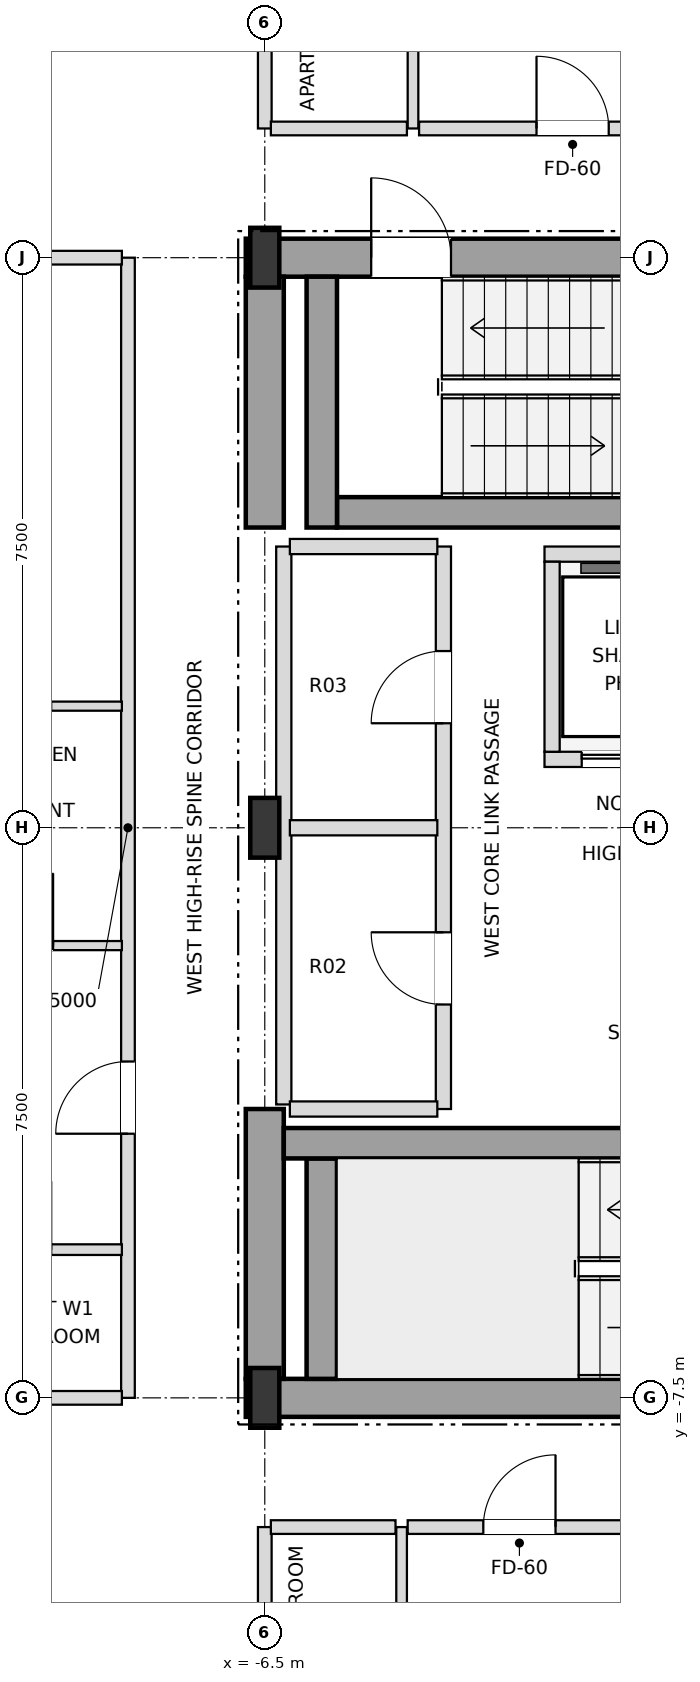
"""IFC4 building model, lengths in metres.
Left out: names, types, materials, properties, quantities, classifications, styles, units other than length and angle.
Written with IfcOpenShell. Run it as: python <this file> out.ifc"""

import sys

from ifc_helpers import new_model, si_unit, direction, frame, frame_2d, origin, origin_2d, place, context, subcontext, project, spatial, rectangle, i_section, extrude, element, fill, save


model = new_model("IFC4")
c1 = context("Model", 3, precision=1e-05, world=origin(), true_north=direction((0.0, 1.0)))
c2 = subcontext(c1, "Body", "Model", "MODEL_VIEW")
j1 = project(units=[si_unit("LENGTHUNIT", "METRE"), si_unit("PLANEANGLEUNIT", "RADIAN")], contexts=[c1])
p1 = place(None, origin())
s1 = spatial("IfcSite", under=j1, at=p1, CompositionType="ELEMENT")
p2 = place(p1, origin())
s2 = spatial("IfcBuilding", under=s1, at=p2, CompositionType="ELEMENT")
p3 = place(p2, frame((0.0, 0.0, 243.9)))
s3 = spatial("IfcBuildingStorey", under=s2, at=p3, CompositionType="ELEMENT", Elevation=243.9)
for number, where, z_axis, x_axis in (
    (1, (-6.5, -7.5, 0.0), (0.0, 0.0, 1.0), (1.0, 0.0, 0.0)),
    (2, (-6.5, 0.0, 0.0), (0.0, 0.0, 1.0), (1.0, 0.0, 0.0)),
    (3, (-6.5, 7.5, 0.0), (0.0, 0.0, 1.0), (1.0, 0.0, 0.0)),
):
    element("IfcColumn", number, at=place(p3, frame(where, z_axis=z_axis, x_axis=x_axis)), inside=s3, PredefinedType="COLUMN", context=c2, shape_type="SweptSolid", body=[
        extrude(i_section(OverallWidth=0.382, OverallDepth=0.786, WebThickness=0.02, FlangeThickness=0.033, at=origin_2d()), origin(), (0.0, 0.0, 1.0), 3.6),
    ])
p4 = place(p3, frame((-6.75, -7.5, 0.0), z_axis=(0.0, 0.0, 1.0), x_axis=(1.0, 0.0, 0.0)))
e4 = element("IfcWall", 4, at=p4, inside=s3, PredefinedType="SHEAR", context=c2, shape_type="SweptSolid", body=[
    extrude(rectangle(XDim=6.75, YDim=0.5, at=frame_2d((3.375, 0.0))), origin(), (0.0, 0.0, 1.0), 3.38),
])
p5 = place(p3, frame((-6.75, 7.5, 0.0), z_axis=(0.0, 0.0, 1.0), x_axis=(1.0, 0.0, 0.0)))
e5 = element("IfcWall", 5, at=p5, inside=s3, PredefinedType="SHEAR", context=c2, shape_type="SweptSolid", body=[
    extrude(rectangle(XDim=6.75, YDim=0.5, at=frame_2d((3.375, 0.0))), origin(), (0.0, 0.0, 1.0), 3.38),
])
p6 = place(p5, frame((1.65, 0.0, 0.0)))
e6 = element("IfcOpeningElement", 6, at=p6, cuts=e5, PredefinedType="OPENING", context=c2, shape_type="SweptSolid", body=[
    extrude(rectangle(XDim=1.05, YDim=2.15, at=frame_2d((0.525, 1.075))), frame((0.0, 0.26, 0.0), z_axis=(0.0, -1.0, 0.0), x_axis=(1.0, 0.0, 0.0)), (0.0, 0.0, 1.0), 0.52),
])
p7 = place(p3, frame((-6.5, -7.25, 0.0), z_axis=(0.0, 0.0, 1.0), x_axis=(0.0, 1.0, 0.0)))
e7 = element("IfcWall", 7, at=p7, inside=s3, PredefinedType="SHEAR", context=c2, shape_type="SweptSolid", body=[
    extrude(rectangle(XDim=3.55, YDim=0.5, at=frame_2d((1.775, 0.0))), origin(), (0.0, 0.0, 1.0), 3.38),
])
p8 = place(p3, frame((-6.5, 3.95, 0.0), z_axis=(0.0, 0.0, 1.0), x_axis=(0.0, 1.0, 0.0)))
e8 = element("IfcWall", 8, at=p8, inside=s3, PredefinedType="SHEAR", context=c2, shape_type="SweptSolid", body=[
    extrude(rectangle(XDim=3.3, YDim=0.5, at=frame_2d((1.65, 0.0))), origin(), (0.0, 0.0, 1.0), 3.38),
])
p9 = place(p3, frame((-5.75, -7.25, 0.0), z_axis=(0.0, 0.0, 1.0), x_axis=(0.0, 1.0, 0.0)))
e9 = element("IfcWall", 9, at=p9, inside=s3, PredefinedType="SHEAR", context=c2, shape_type="SweptSolid", body=[
    extrude(rectangle(XDim=2.9, YDim=0.4, at=frame_2d((1.45, 0.0))), origin(), (0.0, 0.0, 1.0), 3.38),
])
p10 = place(p3, frame((-6.25, -4.15, 0.0), z_axis=(0.0, 0.0, 1.0), x_axis=(1.0, 0.0, 0.0)))
e10 = element("IfcWall", 10, at=p10, inside=s3, PredefinedType="SHEAR", context=c2, shape_type="SweptSolid", body=[
    extrude(rectangle(XDim=7.78, YDim=0.4, at=frame_2d((3.89, 0.0))), origin(), (0.0, 0.0, 1.0), 3.38),
])
p11 = place(p3, frame((-5.55, 4.15, 0.0), z_axis=(0.0, 0.0, 1.0), x_axis=(1.0, 0.0, 0.0)))
e11 = element("IfcWall", 11, at=p11, inside=s3, PredefinedType="SHEAR", context=c2, shape_type="SweptSolid", body=[
    extrude(rectangle(XDim=7.08, YDim=0.4, at=frame_2d((3.54, 0.0))), origin(), (0.0, 0.0, 1.0), 3.38),
])
p12 = place(p3, frame((-5.75, 3.95, 0.0), z_axis=(0.0, 0.0, 1.0), x_axis=(0.0, 1.0, 0.0)))
e12 = element("IfcWall", 12, at=p12, inside=s3, PredefinedType="SHEAR", context=c2, shape_type="SweptSolid", body=[
    extrude(rectangle(XDim=3.3, YDim=0.4, at=frame_2d((1.65, 0.0))), origin(), (0.0, 0.0, 1.0), 3.38),
])
p13 = place(p3, frame((-2.82, 0.9, 0.0), z_axis=(0.0, 0.0, 1.0), x_axis=(1.0, 0.0, 0.0)))
e13 = element("IfcWall", 13, at=p13, inside=s3, PredefinedType="SOLIDWALL", context=c2, shape_type="SweptSolid", body=[
    extrude(rectangle(XDim=5.58, YDim=0.2, at=frame_2d((2.79, 0.0))), origin(), (0.0, 0.0, 1.0), 3.38),
])
p14 = place(p13, frame((0.49, 0.0, 0.0)))
e14 = element("IfcOpeningElement", 14, at=p14, cuts=e13, PredefinedType="OPENING", context=c2, shape_type="SweptSolid", body=[
    extrude(rectangle(XDim=1.1, YDim=2.15, at=frame_2d((0.55, 1.075))), frame((0.0, 0.11, 0.0), z_axis=(0.0, -1.0, 0.0), x_axis=(1.0, 0.0, 0.0)), (0.0, 0.0, 1.0), 0.22),
])
p15 = place(p13, frame((2.17, 0.0, 0.0)))
e15 = element("IfcOpeningElement", 15, at=p15, cuts=e13, PredefinedType="OPENING", context=c2, shape_type="SweptSolid", body=[
    extrude(rectangle(XDim=1.1, YDim=2.15, at=frame_2d((0.55, 1.075))), frame((0.0, 0.11, 0.0), z_axis=(0.0, -1.0, 0.0), x_axis=(1.0, 0.0, 0.0)), (0.0, 0.0, 1.0), 0.22),
])
p16 = place(p13, frame((3.86, 0.0, 0.0)))
e16 = element("IfcOpeningElement", 16, at=p16, cuts=e13, PredefinedType="OPENING", context=c2, shape_type="SweptSolid", body=[
    extrude(rectangle(XDim=1.2, YDim=2.2, at=frame_2d((0.6, 1.1))), frame((0.0, 0.11, 0.0), z_axis=(0.0, -1.0, 0.0), x_axis=(1.0, 0.0, 0.0)), (0.0, 0.0, 1.0), 0.22),
])
p17 = place(p3, frame((-2.82, 3.6, 0.0), z_axis=(0.0, 0.0, 1.0), x_axis=(1.0, 0.0, 0.0)))
e17 = element("IfcWall", 17, at=p17, inside=s3, PredefinedType="SOLIDWALL", context=c2, shape_type="SweptSolid", body=[
    extrude(rectangle(XDim=5.58, YDim=0.2, at=frame_2d((2.79, 0.0))), origin(), (0.0, 0.0, 1.0), 3.38),
])
p18 = place(p3, frame((-2.72, 1.0, 0.0), z_axis=(0.0, 0.0, 1.0), x_axis=(0.0, 1.0, 0.0)))
e18 = element("IfcWall", 18, at=p18, inside=s3, PredefinedType="SOLIDWALL", context=c2, shape_type="SweptSolid", body=[
    extrude(rectangle(XDim=2.5, YDim=0.2, at=frame_2d((1.25, 0.0))), origin(), (0.0, 0.0, 1.0), 3.38),
])
p19 = place(p3, frame((-8.3, -7.5, 0.0), z_axis=(0.0, 0.0, 1.0), x_axis=(0.0, 1.0, 0.0)))
e19 = element("IfcWall", 19, at=p19, inside=s3, PredefinedType="PARTITIONING", context=c2, shape_type="SweptSolid", body=[
    extrude(rectangle(XDim=15.0, YDim=0.18, at=frame_2d((7.5, 0.0))), origin(), (0.0, 0.0, 1.0), 3.38),
])
p20 = place(p19, frame((3.475, 0.0, 0.0)))
e20 = element("IfcOpeningElement", 20, at=p20, cuts=e19, PredefinedType="OPENING", context=c2, shape_type="SweptSolid", body=[
    extrude(rectangle(XDim=0.95, YDim=2.15, at=frame_2d((0.475, 1.075))), frame((0.0, 0.1, 0.0), z_axis=(0.0, -1.0, 0.0), x_axis=(1.0, 0.0, 0.0)), (0.0, 0.0, 1.0), 0.2),
])
for number, where, z_axis, x_axis in (
    (21, (-6.5, -19.9, 0.0), (0.0, 0.0, 1.0), (0.0, 1.0, 0.0)),
    (22, (-6.5, 9.2, 0.0), (0.0, 0.0, 1.0), (0.0, 1.0, 0.0)),
):
    element("IfcWall", number, at=place(p3, frame(where, z_axis=z_axis, x_axis=x_axis)), inside=s3, PredefinedType="PARTITIONING", context=c2, shape_type="SweptSolid", body=[
        extrude(rectangle(XDim=10.7, YDim=0.18, at=frame_2d((5.35, 0.0))), origin(), (0.0, 0.0, 1.0), 2.826),
    ])
p21 = place(p3, frame((-6.25, -3.64, 0.0), z_axis=(0.0, 0.0, 1.0), x_axis=(0.0, 1.0, 0.0)))
e23 = element("IfcWall", 23, at=p21, inside=s3, PredefinedType="SOLIDWALL", context=c2, shape_type="SweptSolid", body=[
    extrude(rectangle(XDim=7.34, YDim=0.2, at=frame_2d((3.67, 0.0))), origin(), (0.0, 0.0, 1.0), 3.38),
])
p22 = place(p3, frame((-4.7, -13.9, 0.0), z_axis=(0.0, 0.0, 1.0), x_axis=(0.0, 1.0, 0.0)))
e24 = element("IfcWall", 24, at=p22, inside=s3, PredefinedType="PARTITIONING", context=c2, shape_type="SweptSolid", body=[
    extrude(rectangle(XDim=4.7, YDim=0.14, at=frame_2d((2.35, 0.0))), origin(), (0.0, 0.0, 1.0), 3.38),
])
p23 = place(p22, frame((1.9, 0.0, 0.0)))
e25 = element("IfcOpeningElement", 25, at=p23, cuts=e24, PredefinedType="OPENING", context=c2, shape_type="SweptSolid", body=[
    extrude(rectangle(XDim=0.9, YDim=2.1, at=frame_2d((0.45, 1.05))), frame((0.0, 0.08, 0.0), z_axis=(0.0, -1.0, 0.0), x_axis=(1.0, 0.0, 0.0)), (0.0, 0.0, 1.0), 0.16),
])
p24 = place(p3, frame((-4.55, 9.2, 0.0), z_axis=(0.0, 0.0, 1.0), x_axis=(0.0, 1.0, 0.0)))
e26 = element("IfcWall", 26, at=p24, inside=s3, PredefinedType="PARTITIONING", context=c2, shape_type="SweptSolid", body=[
    extrude(rectangle(XDim=4.7, YDim=0.14, at=frame_2d((2.35, 0.0))), origin(), (0.0, 0.0, 1.0), 3.38),
])
p25 = place(p24, frame((1.9, 0.0, 0.0)))
e27 = element("IfcOpeningElement", 27, at=p25, cuts=e26, PredefinedType="OPENING", context=c2, shape_type="SweptSolid", body=[
    extrude(rectangle(XDim=0.9, YDim=2.1, at=frame_2d((0.45, 1.05))), frame((0.0, 0.08, 0.0), z_axis=(0.0, -1.0, 0.0), x_axis=(1.0, 0.0, 0.0)), (0.0, 0.0, 1.0), 0.16),
])
p26 = place(p3, frame((-4.15, -3.7, 0.0), z_axis=(0.0, 0.0, 1.0), x_axis=(0.0, 1.0, 0.0)))
e28 = element("IfcWall", 28, at=p26, inside=s3, PredefinedType="SOLIDWALL", context=c2, shape_type="SweptSolid", body=[
    extrude(rectangle(XDim=7.4, YDim=0.2, at=frame_2d((3.7, 0.0))), origin(), (0.0, 0.0, 1.0), 3.38),
])
p27 = place(p26, frame((1.375, 0.0, 0.0)))
e29 = element("IfcOpeningElement", 29, at=p27, cuts=e28, PredefinedType="OPENING", context=c2, shape_type="SweptSolid", body=[
    extrude(rectangle(XDim=0.95, YDim=2.15, at=frame_2d((0.475, 1.075))), frame((0.0, 0.11, 0.0), z_axis=(0.0, -1.0, 0.0), x_axis=(1.0, 0.0, 0.0)), (0.0, 0.0, 1.0), 0.22),
])
p28 = place(p26, frame((5.075, 0.0, 0.0)))
e30 = element("IfcOpeningElement", 30, at=p28, cuts=e28, PredefinedType="OPENING", context=c2, shape_type="SweptSolid", body=[
    extrude(rectangle(XDim=0.95, YDim=2.15, at=frame_2d((0.475, 1.075))), frame((0.0, 0.11, 0.0), z_axis=(0.0, -1.0, 0.0), x_axis=(1.0, 0.0, 0.0)), (0.0, 0.0, 1.0), 0.22),
])
p29 = place(p3, frame((-6.42, -9.2, 0.0), z_axis=(0.0, 0.0, 1.0), x_axis=(1.0, 0.0, 0.0)))
e31 = element("IfcWall", 31, at=p29, inside=s3, PredefinedType="PARTITIONING", context=c2, shape_type="SweptSolid", body=[
    extrude(rectangle(XDim=1.64, YDim=0.18, at=frame_2d((0.82, 0.0))), origin(), (0.0, 0.0, 1.0), 3.38),
])
p30 = place(p3, frame((-4.62, -9.2, 0.0), z_axis=(0.0, 0.0, 1.0), x_axis=(1.0, 0.0, 0.0)))
e32 = element("IfcWall", 32, at=p30, inside=s3, PredefinedType="PARTITIONING", context=c2, shape_type="SweptSolid", body=[
    extrude(rectangle(XDim=2.94, YDim=0.18, at=frame_2d((1.47, 0.0))), origin(), (0.0, 0.0, 1.0), 3.38),
])
p31 = place(p30, frame((0.995, 0.0, 0.0)))
e33 = element("IfcOpeningElement", 33, at=p31, cuts=e32, PredefinedType="OPENING", context=c2, shape_type="SweptSolid", body=[
    extrude(rectangle(XDim=0.95, YDim=2.15, at=frame_2d((0.475, 1.075))), frame((0.0, 0.1, 0.0), z_axis=(0.0, -1.0, 0.0), x_axis=(1.0, 0.0, 0.0)), (0.0, 0.0, 1.0), 0.2),
])
p32 = place(p3, frame((-11.12, -7.5, 0.0), z_axis=(0.0, 0.0, 1.0), x_axis=(1.0, 0.0, 0.0)))
e34 = element("IfcWall", 34, at=p32, inside=s3, PredefinedType="PARTITIONING", context=c2, shape_type="SweptSolid", body=[
    extrude(rectangle(XDim=2.74, YDim=0.18, at=frame_2d((1.37, 0.0))), origin(), (0.0, 0.0, 1.0), 2.826),
])
p33 = place(p3, frame((-11.12, -5.55, 0.0), z_axis=(0.0, 0.0, 1.0), x_axis=(1.0, 0.0, 0.0)))
e35 = element("IfcWall", 35, at=p33, inside=s3, PredefinedType="PARTITIONING", context=c2, shape_type="SweptSolid", body=[
    extrude(rectangle(XDim=2.74, YDim=0.14, at=frame_2d((1.37, 0.0))), origin(), (0.0, 0.0, 1.0), 3.38),
])
p34 = place(p33, frame((0.91, 0.0, 0.0)))
e36 = element("IfcOpeningElement", 36, at=p34, cuts=e35, PredefinedType="OPENING", context=c2, shape_type="SweptSolid", body=[
    extrude(rectangle(XDim=0.9, YDim=2.1, at=frame_2d((0.45, 1.05))), frame((0.0, 0.08, 0.0), z_axis=(0.0, -1.0, 0.0), x_axis=(1.0, 0.0, 0.0)), (0.0, 0.0, 1.0), 0.16),
])
p35 = place(p3, frame((-6.17, -3.7, 0.0), z_axis=(0.0, 0.0, 1.0), x_axis=(1.0, 0.0, 0.0)))
e37 = element("IfcWall", 37, at=p35, inside=s3, PredefinedType="SOLIDWALL", context=c2, shape_type="SweptSolid", body=[
    extrude(rectangle(XDim=1.94, YDim=0.2, at=frame_2d((0.97, 0.0))), origin(), (0.0, 0.0, 1.0), 3.38),
])
p36 = place(p3, frame((-11.12, -1.55, 0.0), z_axis=(0.0, 0.0, 1.0), x_axis=(1.0, 0.0, 0.0)))
e38 = element("IfcWall", 38, at=p36, inside=s3, PredefinedType="PARTITIONING", context=c2, shape_type="SweptSolid", body=[
    extrude(rectangle(XDim=2.74, YDim=0.12, at=frame_2d((1.37, 0.0))), origin(), (0.0, 0.0, 1.0), 3.38),
])
p37 = place(p36, frame((0.885, 0.0, 0.0)))
e39 = element("IfcOpeningElement", 39, at=p37, cuts=e38, PredefinedType="OPENING", context=c2, shape_type="SweptSolid", body=[
    extrude(rectangle(XDim=0.95, YDim=2.1, at=frame_2d((0.475, 1.05))), frame((0.0, 0.07, 0.0), z_axis=(0.0, -1.0, 0.0), x_axis=(1.0, 0.0, 0.0)), (0.0, 0.0, 1.0), 0.14),
])
p38 = place(p3, frame((-6.17, 0.0, 0.0), z_axis=(0.0, 0.0, 1.0), x_axis=(1.0, 0.0, 0.0)))
e40 = element("IfcWall", 40, at=p38, inside=s3, PredefinedType="SOLIDWALL", context=c2, shape_type="SweptSolid", body=[
    extrude(rectangle(XDim=1.94, YDim=0.2, at=frame_2d((0.97, 0.0))), origin(), (0.0, 0.0, 1.0), 3.38),
])
p39 = place(p3, frame((-11.12, 1.6, 0.0), z_axis=(0.0, 0.0, 1.0), x_axis=(1.0, 0.0, 0.0)))
e41 = element("IfcWall", 41, at=p39, inside=s3, PredefinedType="PARTITIONING", context=c2, shape_type="SweptSolid", body=[
    extrude(rectangle(XDim=2.74, YDim=0.12, at=frame_2d((1.37, 0.0))), origin(), (0.0, 0.0, 1.0), 3.38),
])
p40 = place(p39, frame((0.91, 0.0, 0.0)))
e42 = element("IfcOpeningElement", 42, at=p40, cuts=e41, PredefinedType="OPENING", context=c2, shape_type="SweptSolid", body=[
    extrude(rectangle(XDim=0.9, YDim=2.1, at=frame_2d((0.45, 1.05))), frame((0.0, 0.07, 0.0), z_axis=(0.0, -1.0, 0.0), x_axis=(1.0, 0.0, 0.0)), (0.0, 0.0, 1.0), 0.14),
])
p41 = place(p3, frame((-6.17, 3.7, 0.0), z_axis=(0.0, 0.0, 1.0), x_axis=(1.0, 0.0, 0.0)))
e43 = element("IfcWall", 43, at=p41, inside=s3, PredefinedType="SOLIDWALL", context=c2, shape_type="SweptSolid", body=[
    extrude(rectangle(XDim=1.94, YDim=0.2, at=frame_2d((0.97, 0.0))), origin(), (0.0, 0.0, 1.0), 3.38),
])
p42 = place(p3, frame((-11.12, 7.5, 0.0), z_axis=(0.0, 0.0, 1.0), x_axis=(1.0, 0.0, 0.0)))
e44 = element("IfcWall", 44, at=p42, inside=s3, PredefinedType="PARTITIONING", context=c2, shape_type="SweptSolid", body=[
    extrude(rectangle(XDim=2.74, YDim=0.18, at=frame_2d((1.37, 0.0))), origin(), (0.0, 0.0, 1.0), 2.826),
])
p43 = place(p3, frame((-6.42, 9.2, 0.0), z_axis=(0.0, 0.0, 1.0), x_axis=(1.0, 0.0, 0.0)))
e45 = element("IfcWall", 45, at=p43, inside=s3, PredefinedType="PARTITIONING", context=c2, shape_type="SweptSolid", body=[
    extrude(rectangle(XDim=1.79, YDim=0.18, at=frame_2d((0.895, 0.0))), origin(), (0.0, 0.0, 1.0), 3.38),
])
p44 = place(p3, frame((-4.47, 9.2, 0.0), z_axis=(0.0, 0.0, 1.0), x_axis=(1.0, 0.0, 0.0)))
e46 = element("IfcWall", 46, at=p44, inside=s3, PredefinedType="PARTITIONING", context=c2, shape_type="SweptSolid", body=[
    extrude(rectangle(XDim=4.04, YDim=0.18, at=frame_2d((2.02, 0.0))), origin(), (0.0, 0.0, 1.0), 3.38),
])
p45 = place(p44, frame((1.545, 0.0, 0.0)))
e47 = element("IfcOpeningElement", 47, at=p45, cuts=e46, PredefinedType="OPENING", context=c2, shape_type="SweptSolid", body=[
    extrude(rectangle(XDim=0.95, YDim=2.15, at=frame_2d((0.475, 1.075))), frame((0.0, 0.1, 0.0), z_axis=(0.0, -1.0, 0.0), x_axis=(1.0, 0.0, 0.0)), (0.0, 0.0, 1.0), 0.2),
])
p46 = place(p6, origin())
e48 = element("IfcDoor", 48, at=p46, inside=s3, OperationType="SINGLE_SWING_LEFT", PredefinedType="DOOR", context=c2, shape_type="SweptSolid", body=[
    extrude(rectangle(XDim=1.05, YDim=2.15, at=frame_2d((0.525, 1.075))), frame((0.0, 0.025, 0.0), z_axis=(0.0, -1.0, 0.0), x_axis=(1.0, 0.0, 0.0)), (0.0, 0.0, 1.0), 0.05),
])
fill(e6, e48)
p47 = place(p14, origin())
e49 = element("IfcDoor", 49, at=p47, inside=s3, OperationType="DOUBLE_DOOR_SLIDING", PredefinedType="DOOR", context=c2, shape_type="SweptSolid", body=[
    extrude(rectangle(XDim=1.1, YDim=2.15, at=frame_2d((0.55, 1.075))), frame((0.0, 0.025, 0.0), z_axis=(0.0, -1.0, 0.0), x_axis=(1.0, 0.0, 0.0)), (0.0, 0.0, 1.0), 0.05),
])
fill(e14, e49)
p48 = place(p27, origin())
e50 = element("IfcDoor", 50, at=p48, inside=s3, OperationType="SINGLE_SWING_RIGHT", PredefinedType="DOOR", context=c2, shape_type="SweptSolid", body=[
    extrude(rectangle(XDim=0.95, YDim=2.15, at=frame_2d((0.475, 1.075))), frame((0.0, 0.025, 0.0), z_axis=(0.0, -1.0, 0.0), x_axis=(1.0, 0.0, 0.0)), (0.0, 0.0, 1.0), 0.05),
])
fill(e29, e50)
p49 = place(p28, origin())
e51 = element("IfcDoor", 51, at=p49, inside=s3, OperationType="SINGLE_SWING_LEFT", PredefinedType="DOOR", context=c2, shape_type="SweptSolid", body=[
    extrude(rectangle(XDim=0.95, YDim=2.15, at=frame_2d((0.475, 1.075))), frame((0.0, 0.025, 0.0), z_axis=(0.0, -1.0, 0.0), x_axis=(1.0, 0.0, 0.0)), (0.0, 0.0, 1.0), 0.05),
])
fill(e30, e51)
p50 = place(p31, origin())
e52 = element("IfcDoor", 52, at=p50, inside=s3, OperationType="SINGLE_SWING_RIGHT", PredefinedType="DOOR", context=c2, shape_type="SweptSolid", body=[
    extrude(rectangle(XDim=0.95, YDim=2.15, at=frame_2d((0.475, 1.075))), frame((0.0, 0.025, 0.0), z_axis=(0.0, -1.0, 0.0), x_axis=(1.0, 0.0, 0.0)), (0.0, 0.0, 1.0), 0.05),
])
fill(e33, e52)
p51 = place(p45, origin())
e53 = element("IfcDoor", 53, at=p51, inside=s3, OperationType="SINGLE_SWING_LEFT", PredefinedType="DOOR", context=c2, shape_type="SweptSolid", body=[
    extrude(rectangle(XDim=0.95, YDim=2.15, at=frame_2d((0.475, 1.075))), frame((0.0, 0.025, 0.0), z_axis=(0.0, -1.0, 0.0), x_axis=(1.0, 0.0, 0.0)), (0.0, 0.0, 1.0), 0.05),
])
fill(e47, e53)
p52 = place(p20, origin())
e54 = element("IfcDoor", 54, at=p52, inside=s3, OperationType="SINGLE_SWING_LEFT", PredefinedType="DOOR", context=c2, shape_type="SweptSolid", body=[
    extrude(rectangle(XDim=0.95, YDim=2.15, at=frame_2d((0.475, 1.075))), frame((0.0, 0.025, 0.0), z_axis=(0.0, -1.0, 0.0), x_axis=(1.0, 0.0, 0.0)), (0.0, 0.0, 1.0), 0.05),
])
fill(e20, e54)
p53 = place(p37, origin())
e55 = element("IfcDoor", 55, at=p53, inside=s3, OperationType="SINGLE_SWING_RIGHT", PredefinedType="DOOR", context=c2, shape_type="SweptSolid", body=[
    extrude(rectangle(XDim=0.95, YDim=2.1, at=frame_2d((0.475, 1.05))), frame((0.0, 0.025, 0.0), z_axis=(0.0, -1.0, 0.0), x_axis=(1.0, 0.0, 0.0)), (0.0, 0.0, 1.0), 0.05),
])
fill(e39, e55)
save(model, sys.argv[1])
